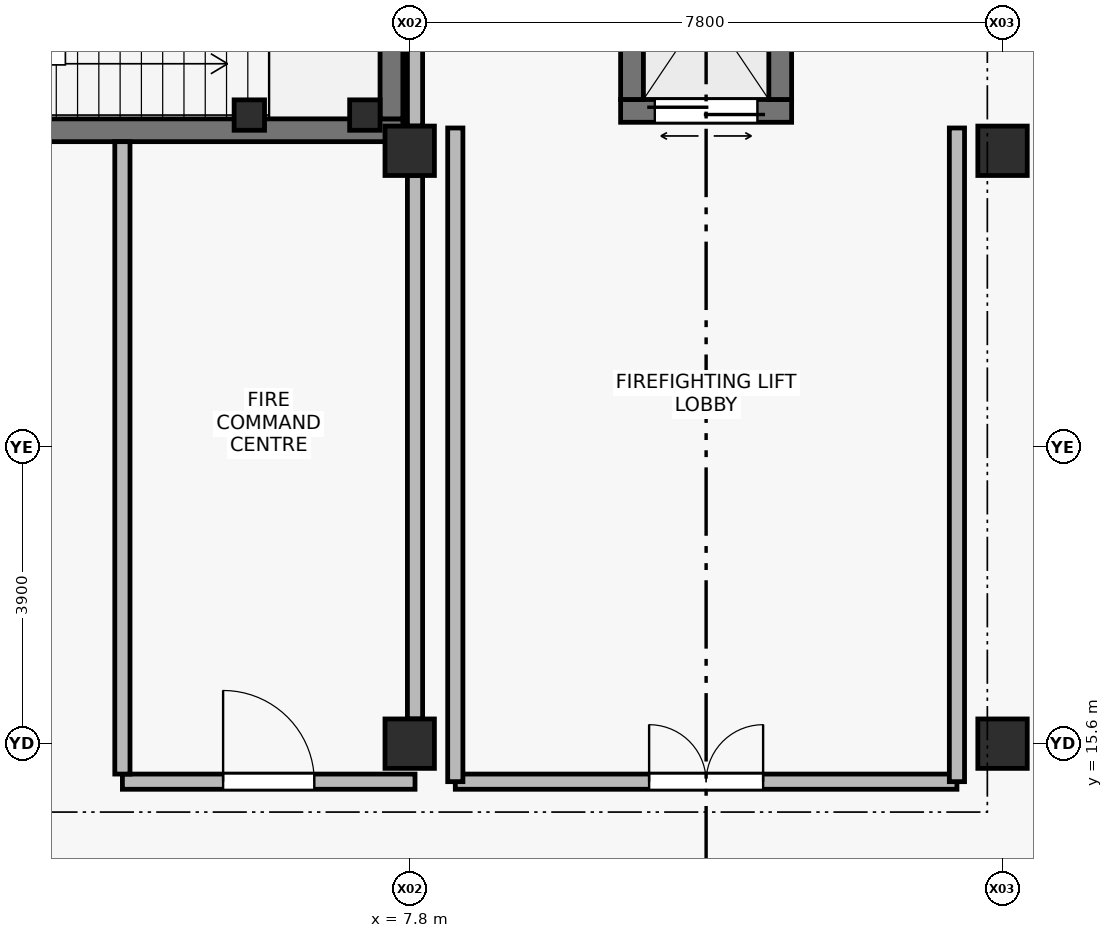
"""IFC4 building model, lengths in metres.
Left out: names, types, materials, properties, quantities, classifications, styles, units other than length and angle.
Written with IfcOpenShell. Run it as: python <this file> out.ifc"""

import sys

from ifc_helpers import new_model, si_unit, direction, frame, frame_2d, origin, origin_2d, place, context, subcontext, project, spatial, rectangle, extrude, element, fill, save


model = new_model("IFC4")
c1 = context("Model", 3, precision=1e-05, world=origin(), true_north=direction((0.0, 1.0)))
c2 = subcontext(c1, "Body", "Model", "MODEL_VIEW")
j1 = project(units=[si_unit("LENGTHUNIT", "METRE"), si_unit("PLANEANGLEUNIT", "RADIAN")], contexts=[c1])
p1 = place(None, origin())
s1 = spatial("IfcSite", under=j1, at=p1, CompositionType="ELEMENT")
p2 = place(p1, origin())
s2 = spatial("IfcBuilding", under=s1, at=p2, CompositionType="ELEMENT")
p3 = place(p2, origin())
s3 = spatial("IfcBuildingStorey", under=s2, at=p3, CompositionType="ELEMENT", Elevation=0.0)
for number, where, z_axis, x_axis in (
    (1, (7.8, 15.6, 0.0), (0.0, 0.0, 1.0), (1.0, 0.0, 0.0)),
    (2, (7.8, 23.4, 0.0), (0.0, 0.0, 1.0), (1.0, 0.0, 0.0)),
    (3, (15.6, 15.6, 0.0), (0.0, 0.0, 1.0), (1.0, 0.0, 0.0)),
    (4, (15.6, 23.4, 0.0), (0.0, 0.0, 1.0), (1.0, 0.0, 0.0)),
):
    element("IfcColumn", number, at=place(p3, frame(where, z_axis=z_axis, x_axis=x_axis)), inside=s3, PredefinedType="COLUMN", context=c2, shape_type="SweptSolid", body=[
        extrude(rectangle(XDim=0.65, YDim=0.65, at=origin_2d()), origin(), (0.0, 0.0, 1.0), 4.8),
    ])
for number, where, z_axis, x_axis in (
    (5, (5.69, 23.87, 0.0), (0.0, 0.0, 1.0), (1.0, 0.0, 0.0)),
    (6, (7.21, 23.87, 0.0), (0.0, 0.0, 1.0), (1.0, 0.0, 0.0)),
):
    element("IfcColumn", number, at=place(p3, frame(where, z_axis=z_axis, x_axis=x_axis)), inside=s3, PredefinedType="COLUMN", context=c2, shape_type="SweptSolid", body=[
        extrude(rectangle(XDim=0.4, YDim=0.4, at=origin_2d()), origin(), (0.0, 0.0, 1.0), 4.8),
    ])
p4 = place(p3, frame((0.15, 23.67, 0.0), z_axis=(0.0, 0.0, 1.0), x_axis=(1.0, 0.0, 0.0)))
e7 = element("IfcWall", 7, at=p4, inside=s3, PredefinedType="SHEAR", context=c2, shape_type="SweptSolid", body=[
    extrude(rectangle(XDim=7.56, YDim=0.3, at=frame_2d((3.78, 0.0))), origin(), (0.0, 0.0, 1.0), 4.54),
])
p5 = place(p4, frame((0.56, 0.0, 0.0)))
e8 = element("IfcOpeningElement", 8, at=p5, cuts=e7, PredefinedType="OPENING", context=c2, shape_type="SweptSolid", body=[
    extrude(rectangle(XDim=1.4, YDim=2.2, at=frame_2d((0.7, 1.1))), frame((0.0, 0.16, 0.0), z_axis=(0.0, -1.0, 0.0), x_axis=(1.0, 0.0, 0.0)), (0.0, 0.0, 1.0), 0.32),
])
p6 = place(p3, frame((7.56, 23.82, 0.0), z_axis=(0.0, 0.0, 1.0), x_axis=(0.0, 1.0, 0.0)))
e9 = element("IfcWall", 9, at=p6, inside=s3, PredefinedType="SHEAR", context=c2, shape_type="SweptSolid", body=[
    extrude(rectangle(XDim=3.33, YDim=0.3, at=frame_2d((1.665, 0.0))), origin(), (0.0, 0.0, 1.0), 4.54),
])
p7 = place(p3, frame((10.575, 23.925, 0.0), z_axis=(0.0, 0.0, 1.0), x_axis=(1.0, 0.0, 0.0)))
e10 = element("IfcWall", 10, at=p7, inside=s3, PredefinedType="SHEAR", context=c2, shape_type="SweptSolid", body=[
    extrude(rectangle(XDim=2.25, YDim=0.3, at=frame_2d((1.125, 0.0))), origin(), (0.0, 0.0, 1.0), 4.54),
])
p8 = place(p7, frame((0.45, 0.0, 0.0)))
e11 = element("IfcOpeningElement", 11, at=p8, cuts=e10, PredefinedType="OPENING", context=c2, shape_type="SweptSolid", body=[
    extrude(rectangle(XDim=1.35, YDim=2.3, at=frame_2d((0.675, 1.15))), frame((0.0, 0.16, 0.0), z_axis=(0.0, -1.0, 0.0), x_axis=(1.0, 0.0, 0.0)), (0.0, 0.0, 1.0), 0.32),
])
for number, where, z_axis, x_axis in (
    (12, (10.725, 26.525, 0.0), (0.0, 0.0, 1.0), (0.0, -1.0, 0.0)),
    (13, (12.675, 24.075, 0.0), (0.0, 0.0, 1.0), (0.0, 1.0, 0.0)),
):
    element("IfcWall", number, at=place(p3, frame(where, z_axis=z_axis, x_axis=x_axis)), inside=s3, PredefinedType="SHEAR", context=c2, shape_type="SweptSolid", body=[
        extrude(rectangle(XDim=2.45, YDim=0.3, at=frame_2d((1.225, 0.0))), origin(), (0.0, 0.0, 1.0), 4.54),
    ])
p9 = place(p3, frame((8.4, 15.1, 0.0), z_axis=(0.0, 0.0, 1.0), x_axis=(1.0, 0.0, 0.0)))
e14 = element("IfcWall", 14, at=p9, inside=s3, PredefinedType="SOLIDWALL", context=c2, shape_type="SweptSolid", body=[
    extrude(rectangle(XDim=6.6, YDim=0.2, at=frame_2d((3.3, 0.0))), origin(), (0.0, 0.0, 1.0), 4.54),
])
p10 = place(p9, frame((2.55, 0.0, 0.0)))
e15 = element("IfcOpeningElement", 15, at=p10, cuts=e14, PredefinedType="OPENING", context=c2, shape_type="SweptSolid", body=[
    extrude(rectangle(XDim=1.5, YDim=2.2, at=frame_2d((0.75, 1.1))), frame((0.0, 0.11, 0.0), z_axis=(0.0, -1.0, 0.0), x_axis=(1.0, 0.0, 0.0)), (0.0, 0.0, 1.0), 0.22),
])
for number, where, z_axis, x_axis in (
    (16, (8.4, 23.7, 0.0), (0.0, 0.0, 1.0), (0.0, -1.0, 0.0)),
    (17, (15.0, 15.1, 0.0), (0.0, 0.0, 1.0), (0.0, 1.0, 0.0)),
):
    element("IfcWall", number, at=place(p3, frame(where, z_axis=z_axis, x_axis=x_axis)), inside=s3, PredefinedType="SOLIDWALL", context=c2, shape_type="SweptSolid", body=[
        extrude(rectangle(XDim=8.6, YDim=0.2, at=frame_2d((4.3, 0.0))), origin(), (0.0, 0.0, 1.0), 4.54),
    ])
p11 = place(p3, frame((4.02, 15.1, 0.0), z_axis=(0.0, 0.0, 1.0), x_axis=(1.0, 0.0, 0.0)))
e18 = element("IfcWall", 18, at=p11, inside=s3, PredefinedType="SOLIDWALL", context=c2, shape_type="SweptSolid", body=[
    extrude(rectangle(XDim=3.85, YDim=0.2, at=frame_2d((1.925, 0.0))), origin(), (0.0, 0.0, 1.0), 4.54),
])
p12 = place(p11, frame((1.325, 0.0, 0.0)))
e19 = element("IfcOpeningElement", 19, at=p12, cuts=e18, PredefinedType="OPENING", context=c2, shape_type="SweptSolid", body=[
    extrude(rectangle(XDim=1.2, YDim=2.2, at=frame_2d((0.6, 1.1))), frame((0.0, 0.11, 0.0), z_axis=(0.0, -1.0, 0.0), x_axis=(1.0, 0.0, 0.0)), (0.0, 0.0, 1.0), 0.22),
])
p13 = place(p3, frame((4.02, 15.2, 0.0), z_axis=(0.0, 0.0, 1.0), x_axis=(0.0, 1.0, 0.0)))
e20 = element("IfcWall", 20, at=p13, inside=s3, PredefinedType="SOLIDWALL", context=c2, shape_type="SweptSolid", body=[
    extrude(rectangle(XDim=8.32, YDim=0.2, at=frame_2d((4.16, 0.0))), origin(), (0.0, 0.0, 1.0), 4.54),
])
p14 = place(p3, frame((7.87, 15.925, 0.0), z_axis=(0.0, 0.0, 1.0), x_axis=(0.0, 1.0, 0.0)))
e21 = element("IfcWall", 21, at=p14, inside=s3, PredefinedType="SOLIDWALL", context=c2, shape_type="SweptSolid", body=[
    extrude(rectangle(XDim=7.15, YDim=0.2, at=frame_2d((3.575, 0.0))), origin(), (0.0, 0.0, 1.0), 4.09),
])
p15 = place(p3, frame((7.87, 23.725, 0.0), z_axis=(0.0, 0.0, 1.0), x_axis=(0.0, 1.0, 0.0)))
e22 = element("IfcWall", 22, at=p15, inside=s3, PredefinedType="SOLIDWALL", context=c2, shape_type="SweptSolid", body=[
    extrude(rectangle(XDim=3.25, YDim=0.2, at=frame_2d((1.625, 0.0))), origin(), (0.0, 0.0, 1.0), 4.09),
])
p16 = place(p8, origin())
e23 = element("IfcDoor", 23, at=p16, inside=s3, OperationType="DOUBLE_DOOR_SLIDING", PredefinedType="DOOR", context=c2, shape_type="SweptSolid", body=[
    extrude(rectangle(XDim=1.35, YDim=2.3, at=frame_2d((0.675, 1.15))), frame((0.0, 0.025, 0.0), z_axis=(0.0, -1.0, 0.0), x_axis=(1.0, 0.0, 0.0)), (0.0, 0.0, 1.0), 0.05),
])
fill(e11, e23)
p17 = place(p10, origin())
e24 = element("IfcDoor", 24, at=p17, inside=s3, OperationType="DOUBLE_DOOR_SINGLE_SWING", PredefinedType="DOOR", context=c2, shape_type="SweptSolid", body=[
    extrude(rectangle(XDim=1.5, YDim=2.2, at=frame_2d((0.75, 1.1))), frame((0.0, 0.025, 0.0), z_axis=(0.0, -1.0, 0.0), x_axis=(1.0, 0.0, 0.0)), (0.0, 0.0, 1.0), 0.05),
])
fill(e15, e24)
p18 = place(p12, origin())
e25 = element("IfcDoor", 25, at=p18, inside=s3, OperationType="SINGLE_SWING_LEFT", PredefinedType="DOOR", context=c2, shape_type="SweptSolid", body=[
    extrude(rectangle(XDim=1.2, YDim=2.2, at=frame_2d((0.6, 1.1))), frame((0.0, 0.025, 0.0), z_axis=(0.0, -1.0, 0.0), x_axis=(1.0, 0.0, 0.0)), (0.0, 0.0, 1.0), 0.05),
])
fill(e19, e25)
save(model, sys.argv[1])
